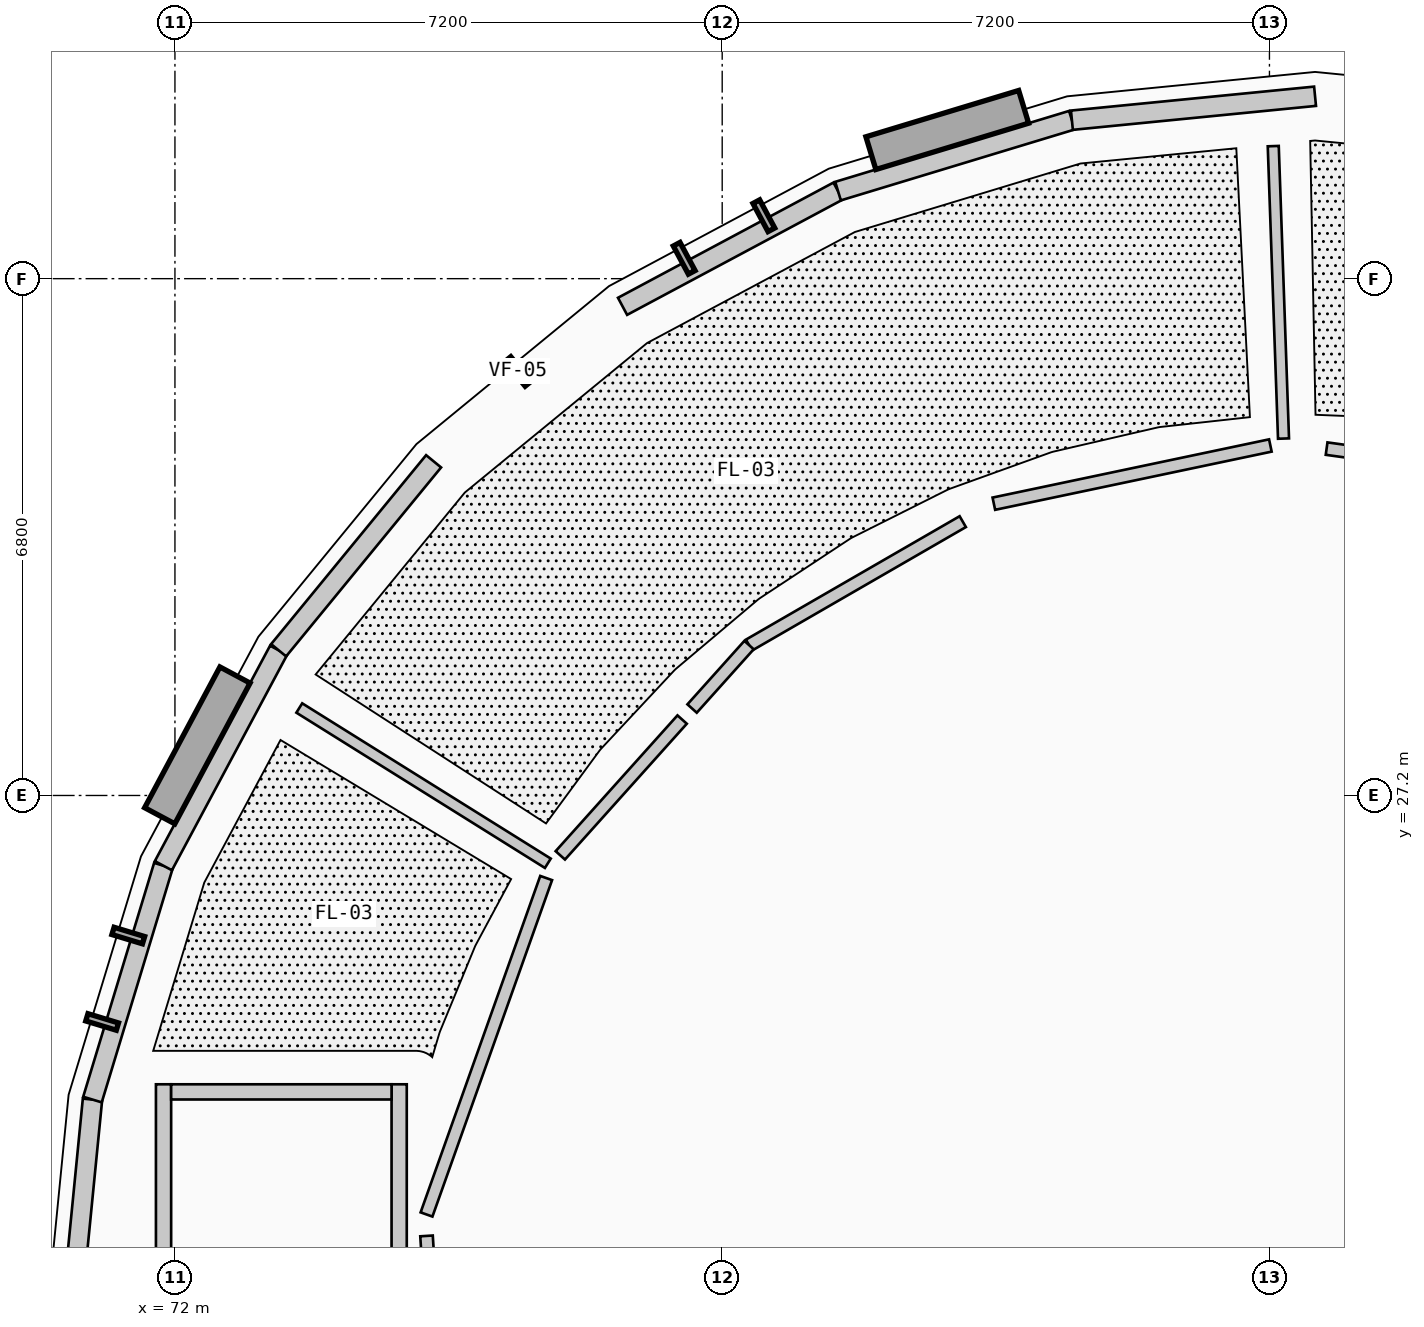
"""IFC4 building model, lengths in metres.
Left out: names, types, materials, properties, quantities, classifications, styles, units other than length and angle.
Written with IfcOpenShell. Run it as: python <this file> out.ifc"""

import sys

from ifc_helpers import new_model, si_unit, direction, frame, frame_2d, origin, origin_2d, place, context, subcontext, project, spatial, rectangle, circle, extrude, element, fill, save


model = new_model("IFC4")
c1 = context("Model", 3, precision=1e-05, world=origin(), true_north=direction((0.0, 1.0)))
c2 = subcontext(c1, "Body", "Model", "MODEL_VIEW")
j1 = project(units=[si_unit("LENGTHUNIT", "METRE"), si_unit("PLANEANGLEUNIT", "RADIAN")], contexts=[c1])
p1 = place(None, origin())
s1 = spatial("IfcSite", under=j1, at=p1, CompositionType="ELEMENT")
p2 = place(p1, origin())
s2 = spatial("IfcBuilding", under=s1, at=p2, CompositionType="ELEMENT")
p3 = place(p2, frame((0.0, 0.0, 4.55)))
s3 = spatial("IfcBuildingStorey", under=s2, at=p3, CompositionType="ELEMENT", Elevation=4.55)
for number, where, z_axis, x_axis in (
    (1, (87.0, 35.88, 0.0), (0.0, 0.0, 1.0), (1.0, 0.0, 0.0)),
    (2, (80.923, 34.671, 0.0), (0.0, 0.0, 1.0), (1.0, 0.0, 0.0)),
    (3, (75.771, 31.229, 0.0), (0.0, 0.0, 1.0), (1.0, 0.0, 0.0)),
    (4, (72.329, 26.077, 0.0), (0.0, 0.0, 1.0), (1.0, 0.0, 0.0)),
    (5, (87.0, 31.82, 0.0), (0.0, 0.0, 1.0), (1.0, 0.0, 0.0)),
    (6, (82.477, 30.92, 0.0), (0.0, 0.0, 1.0), (1.0, 0.0, 0.0)),
    (7, (78.642, 28.358, 0.0), (0.0, 0.0, 1.0), (1.0, 0.0, 0.0)),
    (8, (76.08, 24.523, 0.0), (0.0, 0.0, 1.0), (1.0, 0.0, 0.0)),
):
    element("IfcColumn", number, at=place(p3, frame(where, z_axis=z_axis, x_axis=x_axis)), inside=s3, PredefinedType="COLUMN", context=c2, shape_type="SweptSolid", body=[
        extrude(rectangle(XDim=0.315, YDim=0.315, at=origin_2d()), origin(), (0.0, 0.0, 1.0), 4.2),
    ])
for number, where, z_axis, x_axis in (
    (9, (80.054, 36.768, 0.0), (0.0, 0.0, 1.0), (1.0, 0.0, 0.0)),
    (10, (74.166, 32.834, 0.0), (0.0, 0.0, 1.0), (1.0, 0.0, 0.0)),
    (11, (70.232, 26.946, 0.0), (0.0, 0.0, 1.0), (1.0, 0.0, 0.0)),
):
    element("IfcColumn", number, at=place(p3, frame(where, z_axis=z_axis, x_axis=x_axis)), inside=s3, PredefinedType="COLUMN", context=c2, shape_type="SweptSolid", body=[
        extrude(circle(Radius=0.35, at=origin_2d()), origin(), (0.0, 0.0, 1.0), 4.2),
    ])
p4 = place(p3, frame((70.6, 20.0, 0.0), z_axis=(0.0, 0.0, 1.0), x_axis=(0.097977057849, 0.995188673637, 0.0)))
e12 = element("IfcWall", 12, at=p4, inside=s3, PredefinedType="ELEMENTEDWALL", context=c2, shape_type="SweptSolid", body=[
    extrude(rectangle(XDim=3.214, YDim=0.255, at=frame_2d((1.607, 0.0))), origin(), (0.0, 0.0, 1.0), 3.314),
])
p5 = place(p3, frame((70.915, 23.199, 0.0), z_axis=(0.0, 0.0, 1.0), x_axis=(0.29014016356, 0.956984161567, 0.0)))
e13 = element("IfcWall", 13, at=p5, inside=s3, PredefinedType="ELEMENTEDWALL", context=c2, shape_type="SweptSolid", body=[
    extrude(rectangle(XDim=3.215, YDim=0.255, at=frame_2d((1.607, 0.0))), origin(), (0.0, 0.0, 1.0), 3.314),
])
p6 = place(p5, frame((1.133, 0.0, 0.85)))
e14 = element("IfcOpeningElement", 14, at=p6, cuts=e13, PredefinedType="OPENING", context=c2, shape_type="SweptSolid", body=[
    extrude(rectangle(XDim=0.95, YDim=1.35, at=frame_2d((0.475, 0.675))), frame((0.0, 0.137, 0.0), z_axis=(0.0, -1.0, 0.0), x_axis=(1.0, 0.0, 0.0)), (0.0, 0.0, 1.0), 0.275),
])
p7 = place(p3, frame((71.848, 26.276, 0.0), z_axis=(0.0, 0.0, 1.0), x_axis=(0.47155750426, 0.881835313523, 0.0)))
e15 = element("IfcWall", 15, at=p7, inside=s3, PredefinedType="ELEMENTEDWALL", context=c2, shape_type="SweptSolid", body=[
    extrude(rectangle(XDim=3.215, YDim=0.255, at=frame_2d((1.607, 0.0))), origin(), (0.0, 0.0, 1.0), 3.314),
])
p8 = place(p7, frame((1.132, 0.0, 0.85)))
e16 = element("IfcOpeningElement", 16, at=p8, cuts=e15, PredefinedType="OPENING", context=c2, shape_type="SweptSolid", body=[
    extrude(rectangle(XDim=0.95, YDim=1.6, at=frame_2d((0.475, 0.8))), frame((0.0, 0.137, 0.0), z_axis=(0.0, -1.0, 0.0), x_axis=(1.0, 0.0, 0.0)), (0.0, 0.0, 1.0), 0.275),
])
p9 = place(p3, frame((73.364, 29.111, 0.0), z_axis=(0.0, 0.0, 1.0), x_axis=(0.634204896314, 0.773165020866, 0.0)))
e17 = element("IfcWall", 17, at=p9, inside=s3, PredefinedType="ELEMENTEDWALL", context=c2, shape_type="SweptSolid", body=[
    extrude(rectangle(XDim=3.215, YDim=0.255, at=frame_2d((1.607, 0.0))), origin(), (0.0, 0.0, 1.0), 3.314),
])
p10 = place(p9, frame((1.133, 0.0, 0.85)))
e18 = element("IfcOpeningElement", 18, at=p10, cuts=e17, PredefinedType="OPENING", context=c2, shape_type="SweptSolid", body=[
    extrude(rectangle(XDim=0.95, YDim=1.8, at=frame_2d((0.475, 0.9))), frame((0.0, 0.137, 0.0), z_axis=(0.0, -1.0, 0.0), x_axis=(1.0, 0.0, 0.0)), (0.0, 0.0, 1.0), 0.275),
])
p11 = place(p3, frame((77.889, 33.636, 0.0), z_axis=(0.0, 0.0, 1.0), x_axis=(0.881835313523, 0.47155750426, 0.0)))
e19 = element("IfcWall", 19, at=p11, inside=s3, PredefinedType="ELEMENTEDWALL", context=c2, shape_type="SweptSolid", body=[
    extrude(rectangle(XDim=3.215, YDim=0.255, at=frame_2d((1.607, 0.0))), origin(), (0.0, 0.0, 1.0), 3.314),
])
p12 = place(p11, frame((1.132, 0.0, 0.85)))
e20 = element("IfcOpeningElement", 20, at=p12, cuts=e19, PredefinedType="OPENING", context=c2, shape_type="SweptSolid", body=[
    extrude(rectangle(XDim=0.95, YDim=2.05, at=frame_2d((0.475, 1.025))), frame((0.0, 0.137, 0.0), z_axis=(0.0, -1.0, 0.0), x_axis=(1.0, 0.0, 0.0)), (0.0, 0.0, 1.0), 0.275),
])
p13 = place(p3, frame((80.724, 35.152, 0.0), z_axis=(0.0, 0.0, 1.0), x_axis=(0.956984161567, 0.29014016356, 0.0)))
e21 = element("IfcWall", 21, at=p13, inside=s3, PredefinedType="ELEMENTEDWALL", context=c2, shape_type="SweptSolid", body=[
    extrude(rectangle(XDim=3.215, YDim=0.255, at=frame_2d((1.607, 0.0))), origin(), (0.0, 0.0, 1.0), 3.314),
])
p14 = place(p13, frame((1.118, 0.0, 0.85)))
e22 = element("IfcOpeningElement", 22, at=p14, cuts=e21, PredefinedType="OPENING", context=c2, shape_type="SweptSolid", body=[
    extrude(rectangle(XDim=0.98, YDim=1.5, at=frame_2d((0.49, 0.75))), frame((0.0, 0.137, 0.0), z_axis=(0.0, -1.0, 0.0), x_axis=(1.0, 0.0, 0.0)), (0.0, 0.0, 1.0), 0.275),
])
p15 = place(p3, frame((83.801, 36.085, 0.0), z_axis=(0.0, 0.0, 1.0), x_axis=(0.995188673637, 0.097977057849, 0.0)))
e23 = element("IfcWall", 23, at=p15, inside=s3, PredefinedType="ELEMENTEDWALL", context=c2, shape_type="SweptSolid", body=[
    extrude(rectangle(XDim=3.214, YDim=0.255, at=frame_2d((1.607, 0.0))), origin(), (0.0, 0.0, 1.0), 3.314),
])
p16 = place(p15, frame((1.117, 0.0, 0.85)))
e24 = element("IfcOpeningElement", 24, at=p16, cuts=e23, PredefinedType="OPENING", context=c2, shape_type="SweptSolid", body=[
    extrude(rectangle(XDim=0.98, YDim=1.75, at=frame_2d((0.49, 0.875))), frame((0.0, 0.137, 0.0), z_axis=(0.0, -1.0, 0.0), x_axis=(1.0, 0.0, 0.0)), (0.0, 0.0, 1.0), 0.275),
])
p17 = place(p3, frame((74.95, 16.6, 0.0), z_axis=(0.0, 0.0, 1.0), x_axis=(0.0, 1.0, 0.0)))
e25 = element("IfcWall", 25, at=p17, inside=s3, PredefinedType="SHEAR", context=c2, shape_type="SweptSolid", body=[
    extrude(rectangle(XDim=6.8, YDim=0.2, at=frame_2d((3.4, 0.0))), origin(), (0.0, 0.0, 1.0), 3.3),
])
p18 = place(p17, frame((0.38, 0.0, 0.0)))
e26 = element("IfcOpeningElement", 26, at=p18, cuts=e25, PredefinedType="OPENING", context=c2, shape_type="SweptSolid", body=[
    extrude(rectangle(XDim=1.1, YDim=2.15, at=frame_2d((0.55, 1.075))), frame((0.0, 0.11, 0.0), z_axis=(0.0, -1.0, 0.0), x_axis=(1.0, 0.0, 0.0)), (0.0, 0.0, 1.0), 0.22),
])
p19 = place(p3, frame((71.85, 16.6, 0.0), z_axis=(0.0, 0.0, 1.0), x_axis=(0.0, 1.0, 0.0)))
e27 = element("IfcWall", 27, at=p19, inside=s3, PredefinedType="SHEAR", context=c2, shape_type="SweptSolid", body=[
    extrude(rectangle(XDim=6.8, YDim=0.2, at=frame_2d((3.4, 0.0))), origin(), (0.0, 0.0, 1.0), 3.3),
])
p20 = place(p3, frame((74.85, 23.3, 0.0), z_axis=(0.0, 0.0, 1.0), x_axis=(-1.0, 0.0, 0.0)))
e28 = element("IfcWall", 28, at=p20, inside=s3, PredefinedType="SHEAR", context=c2, shape_type="SweptSolid", body=[
    extrude(rectangle(XDim=2.9, YDim=0.2, at=frame_2d((1.45, 0.0))), origin(), (0.0, 0.0, 1.0), 3.3),
])
p21 = place(p3, frame((86.585, 31.896, 0.0), z_axis=(0.0, 0.0, 1.0), x_axis=(-0.035065029067, 0.999385032776, 0.0)))
e29 = element("IfcWall", 29, at=p21, inside=s3, PredefinedType="PARTITIONING", context=c2, shape_type="SweptSolid", body=[
    extrude(rectangle(XDim=3.85, YDim=0.145, at=frame_2d((1.925, 0.0))), origin(), (0.0, 0.0, 1.0), 3.3),
])
p22 = place(p3, frame((76.906, 26.308, 0.0), z_axis=(0.0, 0.0, 1.0), x_axis=(-0.848090779094, 0.529850951132, 0.0)))
e30 = element("IfcWall", 30, at=p22, inside=s3, PredefinedType="PARTITIONING", context=c2, shape_type="SweptSolid", body=[
    extrude(rectangle(XDim=3.856, YDim=0.145, at=frame_2d((1.928, 0.0))), origin(), (0.0, 0.0, 1.0), 3.3),
])
p23 = place(p3, frame((90.446, 31.307, 0.0), z_axis=(0.0, 0.0, 1.0), x_axis=(-0.990511159367, 0.137432322142, 0.0)))
e31 = element("IfcWall", 31, at=p23, inside=s3, PredefinedType="PARTITIONING", context=c2, shape_type="SweptSolid", body=[
    extrude(rectangle(XDim=3.325, YDim=0.165, at=frame_2d((1.663, 0.0))), origin(), (0.0, 0.0, 1.0), 3.3),
])
p24 = place(p3, frame((86.412, 31.805, 0.0), z_axis=(0.0, 0.0, 1.0), x_axis=(-0.978553268449, -0.20599393391, 0.0)))
e32 = element("IfcWall", 32, at=p24, inside=s3, PredefinedType="PARTITIONING", context=c2, shape_type="SweptSolid", body=[
    extrude(rectangle(XDim=3.718, YDim=0.165, at=frame_2d((1.859, 0.0))), origin(), (0.0, 0.0, 1.0), 3.3),
])
p25 = place(p24, frame((1.349, 0.0, 0.0)))
e33 = element("IfcOpeningElement", 33, at=p25, cuts=e32, PredefinedType="OPENING", context=c2, shape_type="SweptSolid", body=[
    extrude(rectangle(XDim=1.02, YDim=2.26, at=frame_2d((0.51, 1.13))), frame((0.0, 0.093, 0.0), z_axis=(0.0, -1.0, 0.0), x_axis=(1.0, 0.0, 0.0)), (0.0, 0.0, 1.0), 0.185),
])
p26 = place(p3, frame((82.365, 30.803, 0.0), z_axis=(0.0, 0.0, 1.0), x_axis=(-0.865957694089, -0.500117258298, 0.0)))
e34 = element("IfcWall", 34, at=p26, inside=s3, PredefinedType="PARTITIONING", context=c2, shape_type="SweptSolid", body=[
    extrude(rectangle(XDim=3.247, YDim=0.165, at=frame_2d((1.624, 0.0))), origin(), (0.0, 0.0, 1.0), 3.3),
])
p27 = place(p3, frame((79.553, 29.179, 0.0), z_axis=(0.0, 0.0, 1.0), x_axis=(-0.667761349915, -0.744375429175, 0.0)))
e35 = element("IfcWall", 35, at=p27, inside=s3, PredefinedType="PARTITIONING", context=c2, shape_type="SweptSolid", body=[
    extrude(rectangle(XDim=1.122, YDim=0.165, at=frame_2d((0.561, 0.0))), origin(), (0.0, 0.0, 1.0), 3.3),
])
p28 = place(p3, frame((78.673, 28.199, 0.0), z_axis=(0.0, 0.0, 1.0), x_axis=(-0.667778288536, -0.744360233597, 0.0)))
e36 = element("IfcWall", 36, at=p28, inside=s3, PredefinedType="PARTITIONING", context=c2, shape_type="SweptSolid", body=[
    extrude(rectangle(XDim=2.401, YDim=0.165, at=frame_2d((1.2, 0.0))), origin(), (0.0, 0.0, 1.0), 3.3),
])
p29 = place(p3, frame((76.884, 26.114, 0.0), z_axis=(0.0, 0.0, 1.0), x_axis=(-0.334996341217, -0.942219428462, 0.0)))
e37 = element("IfcWall", 37, at=p29, inside=s3, PredefinedType="PARTITIONING", context=c2, shape_type="SweptSolid", body=[
    extrude(rectangle(XDim=4.698, YDim=0.165, at=frame_2d((2.349, 0.0))), origin(), (0.0, 0.0, 1.0), 3.3),
])
p30 = place(p29, frame((2.524, 0.0, 0.0)))
e38 = element("IfcOpeningElement", 38, at=p30, cuts=e37, PredefinedType="OPENING", context=c2, shape_type="SweptSolid", body=[
    extrude(rectangle(XDim=1.06, YDim=2.26, at=frame_2d((0.53, 1.13))), frame((0.0, 0.093, 0.0), z_axis=(0.0, -1.0, 0.0), x_axis=(1.0, 0.0, 0.0)), (0.0, 0.0, 1.0), 0.185),
])
p31 = place(p3, frame((75.31, 21.405, 0.0), z_axis=(0.0, 0.0, 1.0), x_axis=(0.062467347382, -0.998047008167, 0.0)))
e39 = element("IfcWall", 39, at=p31, inside=s3, PredefinedType="PARTITIONING", context=c2, shape_type="SweptSolid", body=[
    extrude(rectangle(XDim=2.56, YDim=0.165, at=frame_2d((1.28, 0.0))), origin(), (0.0, 0.0, 1.0), 3.3),
])
p32 = place(p6, origin())
e40 = element("IfcWindow", 40, at=p32, inside=s3, PartitioningType="SINGLE_PANEL", PredefinedType="WINDOW", context=c2, shape_type="SweptSolid", body=[
    extrude(rectangle(XDim=0.95, YDim=1.35, at=frame_2d((0.475, 0.675))), frame((0.0, 0.03, 0.0), z_axis=(0.0, -1.0, 0.0), x_axis=(1.0, 0.0, 0.0)), (0.0, 0.0, 1.0), 0.06),
])
fill(e14, e40)
p33 = place(p8, origin())
e41 = element("IfcWindow", 41, at=p33, inside=s3, PartitioningType="SINGLE_PANEL", PredefinedType="WINDOW", context=c2, shape_type="SweptSolid", body=[
    extrude(rectangle(XDim=0.95, YDim=1.6, at=frame_2d((0.475, 0.8))), frame((0.0, 0.03, 0.0), z_axis=(0.0, -1.0, 0.0), x_axis=(1.0, 0.0, 0.0)), (0.0, 0.0, 1.0), 0.06),
])
fill(e16, e41)
p34 = place(p10, origin())
e42 = element("IfcWindow", 42, at=p34, inside=s3, PartitioningType="SINGLE_PANEL", PredefinedType="WINDOW", context=c2, shape_type="SweptSolid", body=[
    extrude(rectangle(XDim=0.95, YDim=1.8, at=frame_2d((0.475, 0.9))), frame((0.0, 0.03, 0.0), z_axis=(0.0, -1.0, 0.0), x_axis=(1.0, 0.0, 0.0)), (0.0, 0.0, 1.0), 0.06),
])
fill(e18, e42)
p35 = place(p12, origin())
e43 = element("IfcWindow", 43, at=p35, inside=s3, PartitioningType="SINGLE_PANEL", PredefinedType="WINDOW", context=c2, shape_type="SweptSolid", body=[
    extrude(rectangle(XDim=0.95, YDim=2.05, at=frame_2d((0.475, 1.025))), frame((0.0, 0.03, 0.0), z_axis=(0.0, -1.0, 0.0), x_axis=(1.0, 0.0, 0.0)), (0.0, 0.0, 1.0), 0.06),
])
fill(e20, e43)
p36 = place(p14, origin())
e44 = element("IfcWindow", 44, at=p36, inside=s3, PartitioningType="SINGLE_PANEL", PredefinedType="WINDOW", context=c2, shape_type="SweptSolid", body=[
    extrude(rectangle(XDim=0.98, YDim=1.5, at=frame_2d((0.49, 0.75))), frame((0.0, 0.03, 0.0), z_axis=(0.0, -1.0, 0.0), x_axis=(1.0, 0.0, 0.0)), (0.0, 0.0, 1.0), 0.06),
])
fill(e22, e44)
p37 = place(p16, origin())
e45 = element("IfcWindow", 45, at=p37, inside=s3, PartitioningType="SINGLE_PANEL", PredefinedType="WINDOW", context=c2, shape_type="SweptSolid", body=[
    extrude(rectangle(XDim=0.98, YDim=1.75, at=frame_2d((0.49, 0.875))), frame((0.0, 0.03, 0.0), z_axis=(0.0, -1.0, 0.0), x_axis=(1.0, 0.0, 0.0)), (0.0, 0.0, 1.0), 0.06),
])
fill(e24, e45)
p38 = place(p25, origin())
e46 = element("IfcDoor", 46, at=p38, inside=s3, OperationType="SINGLE_SWING_RIGHT", PredefinedType="DOOR", context=c2, shape_type="SweptSolid", body=[
    extrude(rectangle(XDim=1.02, YDim=2.26, at=frame_2d((0.51, 1.13))), frame((0.0, 0.025, 0.0), z_axis=(0.0, -1.0, 0.0), x_axis=(1.0, 0.0, 0.0)), (0.0, 0.0, 1.0), 0.05),
])
fill(e33, e46)
p39 = place(p30, origin())
e47 = element("IfcDoor", 47, at=p39, inside=s3, OperationType="SINGLE_SWING_LEFT", PredefinedType="DOOR", context=c2, shape_type="SweptSolid", body=[
    extrude(rectangle(XDim=1.06, YDim=2.26, at=frame_2d((0.53, 1.13))), frame((0.0, 0.025, 0.0), z_axis=(0.0, -1.0, 0.0), x_axis=(1.0, 0.0, 0.0)), (0.0, 0.0, 1.0), 0.05),
])
fill(e38, e47)
save(model, sys.argv[1])
